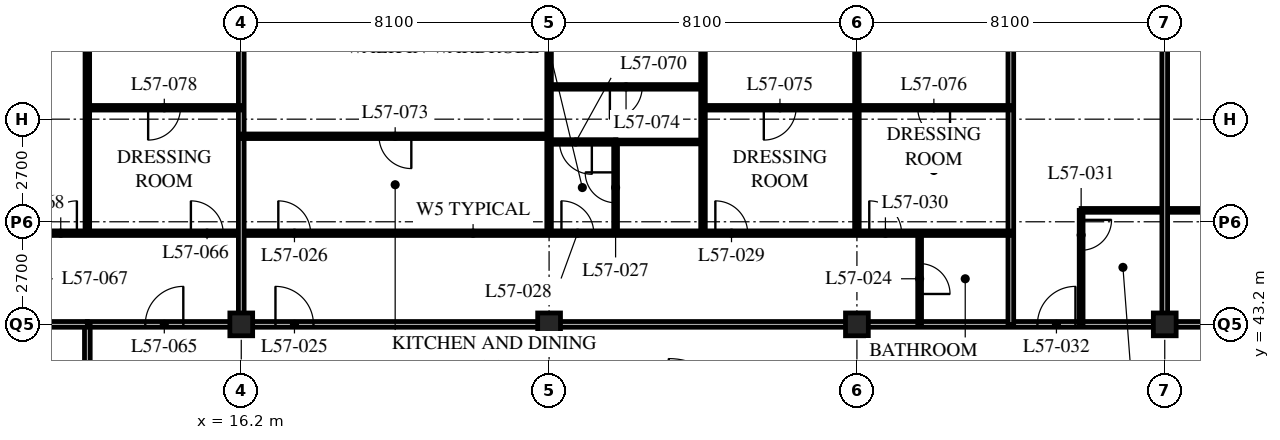
"""IFC4 building model, lengths in metres.
Left out: names, types, materials, properties, quantities, classifications, styles, units other than length and angle.
Written with IfcOpenShell. Run it as: python <this file> out.ifc"""

import sys

from ifc_helpers import new_model, si_unit, direction, frame, frame_2d, origin, origin_2d, place, context, subcontext, project, spatial, rectangle, hollow_rectangle, extrude, element, fill, save


model = new_model("IFC4")
c1 = context("Model", 3, precision=1e-05, world=origin(), true_north=direction((0.0, 1.0)))
c2 = subcontext(c1, "Body", "Model", "MODEL_VIEW")
j1 = project(units=[si_unit("LENGTHUNIT", "METRE"), si_unit("PLANEANGLEUNIT", "RADIAN")], contexts=[c1])
p1 = place(None, origin())
s1 = spatial("IfcSite", under=j1, at=p1, CompositionType="ELEMENT")
p2 = place(p1, origin())
s2 = spatial("IfcBuilding", under=s1, at=p2, CompositionType="ELEMENT")
p3 = place(p2, frame((0.0, 0.0, 220.8)))
s3 = spatial("IfcBuildingStorey", under=s2, at=p3, CompositionType="ELEMENT", Elevation=220.8)
for number, where, z_axis, x_axis in (
    (1, (16.2, 43.2, 0.0), (0.0, 0.0, 1.0), (1.0, 0.0, 0.0)),
    (2, (24.3, 43.2, 0.0), (0.0, 0.0, 1.0), (1.0, 0.0, 0.0)),
    (3, (32.4, 43.2, 0.0), (0.0, 0.0, 1.0), (1.0, 0.0, 0.0)),
    (4, (40.5, 43.2, 0.0), (0.0, 0.0, 1.0), (1.0, 0.0, 0.0)),
):
    element("IfcColumn", number, at=place(p3, frame(where, z_axis=z_axis, x_axis=x_axis)), inside=s3, PredefinedType="COLUMN", context=c2, shape_type="SweptSolid", body=[
        extrude(hollow_rectangle(XDim=0.6, YDim=0.6, WallThickness=0.05, at=origin_2d()), origin(), (0.0, 0.0, 1.0), 3.6),
    ])
p4 = place(p3, frame((12.15, 43.2, 0.0), z_axis=(0.0, 0.0, 1.0), x_axis=(1.0, 0.0, 0.0)))
e5 = element("IfcWall", 5, at=p4, inside=s3, PredefinedType="PARTITIONING", context=c2, shape_type="SweptSolid", body=[
    extrude(rectangle(XDim=36.45, YDim=0.15, at=frame_2d((18.225, 0.0))), origin(), (0.0, 0.0, 1.0), 2.628),
])
p5 = place(p4, frame((4.95, 0.0, 0.0)))
e6 = element("IfcOpeningElement", 6, at=p5, cuts=e5, PredefinedType="OPENING", context=c2, shape_type="SweptSolid", body=[
    extrude(rectangle(XDim=1.0, YDim=2.1, at=frame_2d((0.5, 1.05))), frame((0.0, 0.085, 0.0), z_axis=(0.0, -1.0, 0.0), x_axis=(1.0, 0.0, 0.0)), (0.0, 0.0, 1.0), 0.17),
])
p6 = place(p4, frame((25.0, 0.0, 0.0)))
e7 = element("IfcOpeningElement", 7, at=p6, cuts=e5, PredefinedType="OPENING", context=c2, shape_type="SweptSolid", body=[
    extrude(rectangle(XDim=1.0, YDim=2.1, at=frame_2d((0.5, 1.05))), frame((0.0, 0.085, 0.0), z_axis=(0.0, -1.0, 0.0), x_axis=(1.0, 0.0, 0.0)), (0.0, 0.0, 1.0), 0.17),
])
p7 = place(p4, frame((30.7, 0.0, 0.0)))
e8 = element("IfcOpeningElement", 8, at=p7, cuts=e5, PredefinedType="OPENING", context=c2, shape_type="SweptSolid", body=[
    extrude(rectangle(XDim=1.0, YDim=2.1, at=frame_2d((0.5, 1.05))), frame((0.0, 0.085, 0.0), z_axis=(0.0, -1.0, 0.0), x_axis=(1.0, 0.0, 0.0)), (0.0, 0.0, 1.0), 0.17),
])
p8 = place(p4, frame((33.925, 0.0, 0.0)))
e9 = element("IfcOpeningElement", 9, at=p8, cuts=e5, PredefinedType="OPENING", context=c2, shape_type="SweptSolid", body=[
    extrude(rectangle(XDim=1.0, YDim=2.1, at=frame_2d((0.5, 1.05))), frame((0.0, 0.085, 0.0), z_axis=(0.0, -1.0, 0.0), x_axis=(1.0, 0.0, 0.0)), (0.0, 0.0, 1.0), 0.17),
])
p9 = place(p4, frame((1.525, 0.0, 0.0)))
e10 = element("IfcOpeningElement", 10, at=p9, cuts=e5, PredefinedType="OPENING", context=c2, shape_type="SweptSolid", body=[
    extrude(rectangle(XDim=1.0, YDim=2.1, at=frame_2d((0.5, 1.05))), frame((0.0, 0.085, 0.0), z_axis=(0.0, -1.0, 0.0), x_axis=(1.0, 0.0, 0.0)), (0.0, 0.0, 1.0), 0.17),
])
p10 = place(p3, frame((12.15, 18.9, 0.0), z_axis=(0.0, 0.0, 1.0), x_axis=(0.0, 1.0, 0.0)))
e11 = element("IfcWall", 11, at=p10, inside=s3, PredefinedType="PARTITIONING", context=c2, shape_type="SweptSolid", body=[
    extrude(rectangle(XDim=24.3, YDim=0.15, at=frame_2d((12.15, 0.0))), origin(), (0.0, 0.0, 1.0), 3.39),
])
p11 = place(p10, frame((0.4, 0.0, 0.0)))
e12 = element("IfcOpeningElement", 12, at=p11, cuts=e11, PredefinedType="OPENING", context=c2, shape_type="SweptSolid", body=[
    extrude(rectangle(XDim=1.0, YDim=2.1, at=frame_2d((0.5, 1.05))), frame((0.0, 0.085, 0.0), z_axis=(0.0, -1.0, 0.0), x_axis=(1.0, 0.0, 0.0)), (0.0, 0.0, 1.0), 0.17),
])
p12 = place(p10, frame((16.6, 0.0, 0.0)))
e13 = element("IfcOpeningElement", 13, at=p12, cuts=e11, PredefinedType="OPENING", context=c2, shape_type="SweptSolid", body=[
    extrude(rectangle(XDim=1.0, YDim=2.1, at=frame_2d((0.5, 1.05))), frame((0.0, 0.085, 0.0), z_axis=(0.0, -1.0, 0.0), x_axis=(1.0, 0.0, 0.0)), (0.0, 0.0, 1.0), 0.17),
])
p13 = place(p3, frame((34.05, 43.2, 0.0), z_axis=(0.0, 0.0, 1.0), x_axis=(0.0, 1.0, 0.0)))
e14 = element("IfcWall", 14, at=p13, inside=s3, PredefinedType="PARTITIONING", context=c2, shape_type="SweptSolid", body=[
    extrude(rectangle(XDim=2.4, YDim=0.1, at=frame_2d((1.2, 0.0))), origin(), (0.0, 0.0, 1.0), 3.39),
])
p14 = place(p13, frame((0.8, 0.0, 0.0)))
e15 = element("IfcOpeningElement", 15, at=p14, cuts=e14, PredefinedType="OPENING", context=c2, shape_type="SweptSolid", body=[
    extrude(rectangle(XDim=0.8, YDim=2.1, at=frame_2d((0.4, 1.05))), frame((0.0, 0.06, 0.0), z_axis=(0.0, -1.0, 0.0), x_axis=(1.0, 0.0, 0.0)), (0.0, 0.0, 1.0), 0.12),
])
p15 = place(p3, frame((26.05, 45.6, 0.0), z_axis=(0.0, 0.0, 1.0), x_axis=(0.0, 1.0, 0.0)))
e16 = element("IfcWall", 16, at=p15, inside=s3, PredefinedType="PARTITIONING", context=c2, shape_type="SweptSolid", body=[
    extrude(rectangle(XDim=2.4, YDim=0.1, at=frame_2d((1.2, 0.0))), origin(), (0.0, 0.0, 1.0), 3.39),
])
p16 = place(p15, frame((0.8, 0.0, 0.0)))
e17 = element("IfcOpeningElement", 17, at=p16, cuts=e16, PredefinedType="OPENING", context=c2, shape_type="SweptSolid", body=[
    extrude(rectangle(XDim=0.8, YDim=2.1, at=frame_2d((0.4, 1.05))), frame((0.0, 0.06, 0.0), z_axis=(0.0, -1.0, 0.0), x_axis=(1.0, 0.0, 0.0)), (0.0, 0.0, 1.0), 0.12),
])
p17 = place(p3, frame((26.05, 48.0, 0.0), z_axis=(0.0, 0.0, 1.0), x_axis=(1.0, 0.0, 0.0)))
e18 = element("IfcWall", 18, at=p17, inside=s3, PredefinedType="PARTITIONING", context=c2, shape_type="SweptSolid", body=[
    extrude(rectangle(XDim=2.3, YDim=0.1, at=frame_2d((1.15, 0.0))), origin(), (0.0, 0.0, 1.0), 3.39),
])
p18 = place(p3, frame((24.3, 45.6, 0.0), z_axis=(0.0, 0.0, 1.0), x_axis=(0.0, 1.0, 0.0)))
e19 = element("IfcWall", 19, at=p18, inside=s3, PredefinedType="PARTITIONING", context=c2, shape_type="SweptSolid", body=[
    extrude(rectangle(XDim=13.5, YDim=0.12, at=frame_2d((6.75, 0.0))), origin(), (0.0, 0.0, 1.0), 2.628),
])
p19 = place(p3, frame((28.35, 45.6, 0.0), z_axis=(0.0, 0.0, 1.0), x_axis=(0.0, 1.0, 0.0)))
e20 = element("IfcWall", 20, at=p19, inside=s3, PredefinedType="PARTITIONING", context=c2, shape_type="SweptSolid", body=[
    extrude(rectangle(XDim=13.5, YDim=0.12, at=frame_2d((6.75, 0.0))), origin(), (0.0, 0.0, 1.0), 3.39),
])
p20 = place(p3, frame((32.4, 45.6, 0.0), z_axis=(0.0, 0.0, 1.0), x_axis=(0.0, 1.0, 0.0)))
e21 = element("IfcWall", 21, at=p20, inside=s3, PredefinedType="PARTITIONING", context=c2, shape_type="SweptSolid", body=[
    extrude(rectangle(XDim=13.5, YDim=0.12, at=frame_2d((6.75, 0.0))), origin(), (0.0, 0.0, 1.0), 2.628),
])
p21 = place(p3, frame((36.45, 43.2, 0.0), z_axis=(0.0, 0.0, 1.0), x_axis=(0.0, 1.0, 0.0)))
e22 = element("IfcWall", 22, at=p21, inside=s3, PredefinedType="PARTITIONING", context=c2, shape_type="SweptSolid", body=[
    extrude(rectangle(XDim=15.9, YDim=0.15, at=frame_2d((7.95, 0.0))), origin(), (0.0, 0.0, 1.0), 3.39),
])
p22 = place(p3, frame((38.3, 46.2, 0.0), z_axis=(0.0, 0.0, 1.0), x_axis=(1.0, 0.0, 0.0)))
e23 = element("IfcWall", 23, at=p22, inside=s3, PredefinedType="PARTITIONING", context=c2, shape_type="SweptSolid", body=[
    extrude(rectangle(XDim=4.4, YDim=0.1, at=frame_2d((2.2, 0.0))), origin(), (0.0, 0.0, 1.0), 3.39),
])
p23 = place(p3, frame((38.3, 43.2, 0.0), z_axis=(0.0, 0.0, 1.0), x_axis=(0.0, 1.0, 0.0)))
e24 = element("IfcWall", 24, at=p23, inside=s3, PredefinedType="PARTITIONING", context=c2, shape_type="SweptSolid", body=[
    extrude(rectangle(XDim=3.0, YDim=0.1, at=frame_2d((1.5, 0.0))), origin(), (0.0, 0.0, 1.0), 3.39),
])
p24 = place(p23, frame((1.95, 0.0, 0.0)))
e25 = element("IfcOpeningElement", 25, at=p24, cuts=e24, PredefinedType="OPENING", context=c2, shape_type="SweptSolid", body=[
    extrude(rectangle(XDim=0.8, YDim=2.1, at=frame_2d((0.4, 1.05))), frame((0.0, 0.06, 0.0), z_axis=(0.0, -1.0, 0.0), x_axis=(1.0, 0.0, 0.0)), (0.0, 0.0, 1.0), 0.12),
])
p25 = place(p3, frame((40.5, 43.2, 0.0), z_axis=(0.0, 0.0, 1.0), x_axis=(0.0, 1.0, 0.0)))
e26 = element("IfcWall", 26, at=p25, inside=s3, PredefinedType="PARTITIONING", context=c2, shape_type="SweptSolid", body=[
    extrude(rectangle(XDim=15.9, YDim=0.15, at=frame_2d((7.95, 0.0))), origin(), (0.0, 0.0, 1.0), 2.628),
])
p26 = place(p3, frame((8.15, 45.6, 0.0), z_axis=(0.0, 0.0, 1.0), x_axis=(1.0, 0.0, 0.0)))
e27 = element("IfcWall", 27, at=p26, inside=s3, PredefinedType="PARTITIONING", context=c2, shape_type="SweptSolid", body=[
    extrude(rectangle(XDim=28.3, YDim=0.12, at=frame_2d((14.15, 0.0))), origin(), (0.0, 0.0, 1.0), 3.39),
])
p27 = place(p26, frame((9.025, 0.0, 0.0)))
e28 = element("IfcOpeningElement", 28, at=p27, cuts=e27, PredefinedType="OPENING", context=c2, shape_type="SweptSolid", body=[
    extrude(rectangle(XDim=0.85, YDim=2.1, at=frame_2d((0.425, 1.05))), frame((0.0, 0.07, 0.0), z_axis=(0.0, -1.0, 0.0), x_axis=(1.0, 0.0, 0.0)), (0.0, 0.0, 1.0), 0.14),
])
p28 = place(p26, frame((16.475, 0.0, 0.0)))
e29 = element("IfcOpeningElement", 29, at=p28, cuts=e27, PredefinedType="OPENING", context=c2, shape_type="SweptSolid", body=[
    extrude(rectangle(XDim=0.85, YDim=2.1, at=frame_2d((0.425, 1.05))), frame((0.0, 0.07, 0.0), z_axis=(0.0, -1.0, 0.0), x_axis=(1.0, 0.0, 0.0)), (0.0, 0.0, 1.0), 0.14),
])
p29 = place(p26, frame((20.525, 0.0, 0.0)))
e30 = element("IfcOpeningElement", 30, at=p29, cuts=e27, PredefinedType="OPENING", context=c2, shape_type="SweptSolid", body=[
    extrude(rectangle(XDim=0.85, YDim=2.1, at=frame_2d((0.425, 1.05))), frame((0.0, 0.07, 0.0), z_axis=(0.0, -1.0, 0.0), x_axis=(1.0, 0.0, 0.0)), (0.0, 0.0, 1.0), 0.14),
])
p30 = place(p26, frame((24.575, 0.0, 0.0)))
e31 = element("IfcOpeningElement", 31, at=p30, cuts=e27, PredefinedType="OPENING", context=c2, shape_type="SweptSolid", body=[
    extrude(rectangle(XDim=0.85, YDim=2.1, at=frame_2d((0.425, 1.05))), frame((0.0, 0.07, 0.0), z_axis=(0.0, -1.0, 0.0), x_axis=(1.0, 0.0, 0.0)), (0.0, 0.0, 1.0), 0.14),
])
p31 = place(p26, frame((6.725, 0.0, 0.0)))
e32 = element("IfcOpeningElement", 32, at=p31, cuts=e27, PredefinedType="OPENING", context=c2, shape_type="SweptSolid", body=[
    extrude(rectangle(XDim=0.85, YDim=2.1, at=frame_2d((0.425, 1.05))), frame((0.0, 0.07, 0.0), z_axis=(0.0, -1.0, 0.0), x_axis=(1.0, 0.0, 0.0)), (0.0, 0.0, 1.0), 0.14),
])
p32 = place(p26, frame((2.875, 0.0, 0.0)))
e33 = element("IfcOpeningElement", 33, at=p32, cuts=e27, PredefinedType="OPENING", context=c2, shape_type="SweptSolid", body=[
    extrude(rectangle(XDim=0.85, YDim=2.1, at=frame_2d((0.425, 1.05))), frame((0.0, 0.07, 0.0), z_axis=(0.0, -1.0, 0.0), x_axis=(1.0, 0.0, 0.0)), (0.0, 0.0, 1.0), 0.14),
])
p33 = place(p3, frame((12.15, 45.6, 0.0), z_axis=(0.0, 0.0, 1.0), x_axis=(0.0, 1.0, 0.0)))
e34 = element("IfcWall", 34, at=p33, inside=s3, PredefinedType="PARTITIONING", context=c2, shape_type="SweptSolid", body=[
    extrude(rectangle(XDim=13.5, YDim=0.12, at=frame_2d((6.75, 0.0))), origin(), (0.0, 0.0, 1.0), 3.39),
])
p34 = place(p3, frame((0.3, 43.2, 0.0), z_axis=(0.0, 0.0, 1.0), x_axis=(1.0, 0.0, 0.0)))
e35 = element("IfcWall", 35, at=p34, inside=s3, PredefinedType="PARTITIONING", context=c2, shape_type="SweptSolid", body=[
    extrude(rectangle(XDim=11.85, YDim=0.15, at=frame_2d((5.925, 0.0))), origin(), (0.0, 0.0, 1.0), 2.628),
])
p35 = place(p3, frame((16.2, 43.2, 0.0), z_axis=(0.0, 0.0, 1.0), x_axis=(0.0, 1.0, 0.0)))
e36 = element("IfcWall", 36, at=p35, inside=s3, PredefinedType="PARTITIONING", context=c2, shape_type="SweptSolid", body=[
    extrude(rectangle(XDim=15.9, YDim=0.15, at=frame_2d((7.95, 0.0))), origin(), (0.0, 0.0, 1.0), 2.628),
])
p36 = place(p3, frame((24.3, 48.0, 0.0), z_axis=(0.0, 0.0, 1.0), x_axis=(1.0, 0.0, 0.0)))
e37 = element("IfcWall", 37, at=p36, inside=s3, PredefinedType="PARTITIONING", context=c2, shape_type="SweptSolid", body=[
    extrude(rectangle(XDim=1.76, YDim=0.12, at=frame_2d((0.88, 0.0))), origin(), (0.0, 0.0, 1.0), 3.39),
])
p37 = place(p36, frame((0.275, 0.0, 0.0)))
e38 = element("IfcOpeningElement", 38, at=p37, cuts=e37, PredefinedType="OPENING", context=c2, shape_type="SweptSolid", body=[
    extrude(rectangle(XDim=0.85, YDim=2.1, at=frame_2d((0.425, 1.05))), frame((0.0, 0.07, 0.0), z_axis=(0.0, -1.0, 0.0), x_axis=(1.0, 0.0, 0.0)), (0.0, 0.0, 1.0), 0.14),
])
p38 = place(p3, frame((16.2, 48.15, 0.0), z_axis=(0.0, 0.0, 1.0), x_axis=(1.0, 0.0, 0.0)))
e39 = element("IfcWall", 39, at=p38, inside=s3, PredefinedType="PARTITIONING", context=c2, shape_type="SweptSolid", body=[
    extrude(rectangle(XDim=8.1, YDim=0.12, at=frame_2d((4.05, 0.0))), origin(), (0.0, 0.0, 1.0), 3.39),
])
p39 = place(p38, frame((3.625, 0.0, 0.0)))
e40 = element("IfcOpeningElement", 40, at=p39, cuts=e39, PredefinedType="OPENING", context=c2, shape_type="SweptSolid", body=[
    extrude(rectangle(XDim=0.85, YDim=2.1, at=frame_2d((0.425, 1.05))), frame((0.0, 0.07, 0.0), z_axis=(0.0, -1.0, 0.0), x_axis=(1.0, 0.0, 0.0)), (0.0, 0.0, 1.0), 0.14),
])
p40 = place(p3, frame((24.3, 49.45, 0.0), z_axis=(0.0, 0.0, 1.0), x_axis=(1.0, 0.0, 0.0)))
e41 = element("IfcWall", 41, at=p40, inside=s3, PredefinedType="PARTITIONING", context=c2, shape_type="SweptSolid", body=[
    extrude(rectangle(XDim=4.05, YDim=0.12, at=frame_2d((2.025, 0.0))), origin(), (0.0, 0.0, 1.0), 3.39),
])
p41 = place(p40, frame((1.6, 0.0, 0.0)))
e42 = element("IfcOpeningElement", 42, at=p41, cuts=e41, PredefinedType="OPENING", context=c2, shape_type="SweptSolid", body=[
    extrude(rectangle(XDim=0.85, YDim=2.1, at=frame_2d((0.425, 1.05))), frame((0.0, 0.07, 0.0), z_axis=(0.0, -1.0, 0.0), x_axis=(1.0, 0.0, 0.0)), (0.0, 0.0, 1.0), 0.14),
])
p42 = place(p3, frame((28.35, 48.9, 0.0), z_axis=(0.0, 0.0, 1.0), x_axis=(1.0, 0.0, 0.0)))
e43 = element("IfcWall", 43, at=p42, inside=s3, PredefinedType="PARTITIONING", context=c2, shape_type="SweptSolid", body=[
    extrude(rectangle(XDim=8.1, YDim=0.12, at=frame_2d((4.05, 0.0))), origin(), (0.0, 0.0, 1.0), 3.39),
])
p43 = place(p42, frame((1.6, 0.0, 0.0)))
e44 = element("IfcOpeningElement", 44, at=p43, cuts=e43, PredefinedType="OPENING", context=c2, shape_type="SweptSolid", body=[
    extrude(rectangle(XDim=0.85, YDim=2.1, at=frame_2d((0.425, 1.05))), frame((0.0, 0.07, 0.0), z_axis=(0.0, -1.0, 0.0), x_axis=(1.0, 0.0, 0.0)), (0.0, 0.0, 1.0), 0.14),
])
p44 = place(p42, frame((5.65, 0.0, 0.0)))
e45 = element("IfcOpeningElement", 45, at=p44, cuts=e43, PredefinedType="OPENING", context=c2, shape_type="SweptSolid", body=[
    extrude(rectangle(XDim=0.85, YDim=2.1, at=frame_2d((0.425, 1.05))), frame((0.0, 0.07, 0.0), z_axis=(0.0, -1.0, 0.0), x_axis=(1.0, 0.0, 0.0)), (0.0, 0.0, 1.0), 0.14),
])
p45 = place(p3, frame((12.15, 48.9, 0.0), z_axis=(0.0, 0.0, 1.0), x_axis=(1.0, 0.0, 0.0)))
e46 = element("IfcWall", 46, at=p45, inside=s3, PredefinedType="PARTITIONING", context=c2, shape_type="SweptSolid", body=[
    extrude(rectangle(XDim=4.05, YDim=0.12, at=frame_2d((2.025, 0.0))), origin(), (0.0, 0.0, 1.0), 3.39),
])
p46 = place(p45, frame((1.6, 0.0, 0.0)))
e47 = element("IfcOpeningElement", 47, at=p46, cuts=e46, PredefinedType="OPENING", context=c2, shape_type="SweptSolid", body=[
    extrude(rectangle(XDim=0.85, YDim=2.1, at=frame_2d((0.425, 1.05))), frame((0.0, 0.07, 0.0), z_axis=(0.0, -1.0, 0.0), x_axis=(1.0, 0.0, 0.0)), (0.0, 0.0, 1.0), 0.14),
])
p47 = place(p14, origin())
e48 = element("IfcDoor", 48, at=p47, inside=s3, OperationType="SINGLE_SWING_RIGHT", PredefinedType="DOOR", context=c2, shape_type="SweptSolid", body=[
    extrude(rectangle(XDim=0.8, YDim=2.1, at=frame_2d((0.4, 1.05))), frame((0.0, 0.025, 0.0), z_axis=(0.0, -1.0, 0.0), x_axis=(1.0, 0.0, 0.0)), (0.0, 0.0, 1.0), 0.05),
])
fill(e15, e48)
p48 = place(p5, origin())
e49 = element("IfcDoor", 49, at=p48, inside=s3, OperationType="SINGLE_SWING_LEFT", PredefinedType="DOOR", context=c2, shape_type="SweptSolid", body=[
    extrude(rectangle(XDim=1.0, YDim=2.1, at=frame_2d((0.5, 1.05))), frame((0.0, 0.025, 0.0), z_axis=(0.0, -1.0, 0.0), x_axis=(1.0, 0.0, 0.0)), (0.0, 0.0, 1.0), 0.05),
])
fill(e6, e49)
p49 = place(p27, origin())
e50 = element("IfcDoor", 50, at=p49, inside=s3, OperationType="SINGLE_SWING_LEFT", PredefinedType="DOOR", context=c2, shape_type="SweptSolid", body=[
    extrude(rectangle(XDim=0.85, YDim=2.1, at=frame_2d((0.425, 1.05))), frame((0.0, 0.025, 0.0), z_axis=(0.0, -1.0, 0.0), x_axis=(1.0, 0.0, 0.0)), (0.0, 0.0, 1.0), 0.05),
])
fill(e28, e50)
p50 = place(p16, origin())
e51 = element("IfcDoor", 51, at=p50, inside=s3, OperationType="SINGLE_SWING_RIGHT", PredefinedType="DOOR", context=c2, shape_type="SweptSolid", body=[
    extrude(rectangle(XDim=0.8, YDim=2.1, at=frame_2d((0.4, 1.05))), frame((0.0, 0.025, 0.0), z_axis=(0.0, -1.0, 0.0), x_axis=(1.0, 0.0, 0.0)), (0.0, 0.0, 1.0), 0.05),
])
fill(e17, e51)
p51 = place(p28, origin())
e52 = element("IfcDoor", 52, at=p51, inside=s3, OperationType="SINGLE_SWING_LEFT", PredefinedType="DOOR", context=c2, shape_type="SweptSolid", body=[
    extrude(rectangle(XDim=0.85, YDim=2.1, at=frame_2d((0.425, 1.05))), frame((0.0, 0.025, 0.0), z_axis=(0.0, -1.0, 0.0), x_axis=(1.0, 0.0, 0.0)), (0.0, 0.0, 1.0), 0.05),
])
fill(e29, e52)
p52 = place(p29, origin())
e53 = element("IfcDoor", 53, at=p52, inside=s3, OperationType="SINGLE_SWING_LEFT", PredefinedType="DOOR", context=c2, shape_type="SweptSolid", body=[
    extrude(rectangle(XDim=0.85, YDim=2.1, at=frame_2d((0.425, 1.05))), frame((0.0, 0.025, 0.0), z_axis=(0.0, -1.0, 0.0), x_axis=(1.0, 0.0, 0.0)), (0.0, 0.0, 1.0), 0.05),
])
fill(e30, e53)
p53 = place(p30, origin())
e54 = element("IfcDoor", 54, at=p53, inside=s3, OperationType="SINGLE_SWING_LEFT", PredefinedType="DOOR", context=c2, shape_type="SweptSolid", body=[
    extrude(rectangle(XDim=0.85, YDim=2.1, at=frame_2d((0.425, 1.05))), frame((0.0, 0.025, 0.0), z_axis=(0.0, -1.0, 0.0), x_axis=(1.0, 0.0, 0.0)), (0.0, 0.0, 1.0), 0.05),
])
fill(e31, e54)
p54 = place(p24, origin())
e55 = element("IfcDoor", 55, at=p54, inside=s3, OperationType="SINGLE_SWING_LEFT", PredefinedType="DOOR", context=c2, shape_type="SweptSolid", body=[
    extrude(rectangle(XDim=0.8, YDim=2.1, at=frame_2d((0.4, 1.05))), frame((0.0, 0.025, 0.0), z_axis=(0.0, -1.0, 0.0), x_axis=(1.0, 0.0, 0.0)), (0.0, 0.0, 1.0), 0.05),
])
fill(e25, e55)
p55 = place(p6, origin())
e56 = element("IfcDoor", 56, at=p55, inside=s3, OperationType="SINGLE_SWING_RIGHT", PredefinedType="DOOR", context=c2, shape_type="SweptSolid", body=[
    extrude(rectangle(XDim=1.0, YDim=2.1, at=frame_2d((0.5, 1.05))), frame((0.0, 0.025, 0.0), z_axis=(0.0, -1.0, 0.0), x_axis=(1.0, 0.0, 0.0)), (0.0, 0.0, 1.0), 0.05),
])
fill(e7, e56)
p56 = place(p9, origin())
e57 = element("IfcDoor", 57, at=p56, inside=s3, OperationType="SINGLE_SWING_RIGHT", PredefinedType="DOOR", context=c2, shape_type="SweptSolid", body=[
    extrude(rectangle(XDim=1.0, YDim=2.1, at=frame_2d((0.5, 1.05))), frame((0.0, 0.025, 0.0), z_axis=(0.0, -1.0, 0.0), x_axis=(1.0, 0.0, 0.0)), (0.0, 0.0, 1.0), 0.05),
])
fill(e10, e57)
p57 = place(p31, origin())
e58 = element("IfcDoor", 58, at=p57, inside=s3, OperationType="SINGLE_SWING_LEFT", PredefinedType="DOOR", context=c2, shape_type="SweptSolid", body=[
    extrude(rectangle(XDim=0.85, YDim=2.1, at=frame_2d((0.425, 1.05))), frame((0.0, 0.025, 0.0), z_axis=(0.0, -1.0, 0.0), x_axis=(1.0, 0.0, 0.0)), (0.0, 0.0, 1.0), 0.05),
])
fill(e32, e58)
p58 = place(p32, origin())
e59 = element("IfcDoor", 59, at=p58, inside=s3, OperationType="SINGLE_SWING_RIGHT", PredefinedType="DOOR", context=c2, shape_type="SweptSolid", body=[
    extrude(rectangle(XDim=0.85, YDim=2.1, at=frame_2d((0.425, 1.05))), frame((0.0, 0.025, 0.0), z_axis=(0.0, -1.0, 0.0), x_axis=(1.0, 0.0, 0.0)), (0.0, 0.0, 1.0), 0.05),
])
fill(e33, e59)
p59 = place(p37, origin())
e60 = element("IfcDoor", 60, at=p59, inside=s3, OperationType="SINGLE_SWING_LEFT", PredefinedType="DOOR", context=c2, shape_type="SweptSolid", body=[
    extrude(rectangle(XDim=0.85, YDim=2.1, at=frame_2d((0.425, 1.05))), frame((0.0, 0.025, 0.0), z_axis=(0.0, -1.0, 0.0), x_axis=(1.0, 0.0, 0.0)), (0.0, 0.0, 1.0), 0.05),
])
fill(e38, e60)
p60 = place(p39, origin())
e61 = element("IfcDoor", 61, at=p60, inside=s3, OperationType="SINGLE_SWING_LEFT", PredefinedType="DOOR", context=c2, shape_type="SweptSolid", body=[
    extrude(rectangle(XDim=0.85, YDim=2.1, at=frame_2d((0.425, 1.05))), frame((0.0, 0.025, 0.0), z_axis=(0.0, -1.0, 0.0), x_axis=(1.0, 0.0, 0.0)), (0.0, 0.0, 1.0), 0.05),
])
fill(e40, e61)
p61 = place(p41, origin())
e62 = element("IfcDoor", 62, at=p61, inside=s3, OperationType="SINGLE_SWING_RIGHT", PredefinedType="DOOR", context=c2, shape_type="SweptSolid", body=[
    extrude(rectangle(XDim=0.85, YDim=2.1, at=frame_2d((0.425, 1.05))), frame((0.0, 0.025, 0.0), z_axis=(0.0, -1.0, 0.0), x_axis=(1.0, 0.0, 0.0)), (0.0, 0.0, 1.0), 0.05),
])
fill(e42, e62)
p62 = place(p43, origin())
e63 = element("IfcDoor", 63, at=p62, inside=s3, OperationType="SINGLE_SWING_RIGHT", PredefinedType="DOOR", context=c2, shape_type="SweptSolid", body=[
    extrude(rectangle(XDim=0.85, YDim=2.1, at=frame_2d((0.425, 1.05))), frame((0.0, 0.025, 0.0), z_axis=(0.0, -1.0, 0.0), x_axis=(1.0, 0.0, 0.0)), (0.0, 0.0, 1.0), 0.05),
])
fill(e44, e63)
p63 = place(p44, origin())
e64 = element("IfcDoor", 64, at=p63, inside=s3, OperationType="SINGLE_SWING_LEFT", PredefinedType="DOOR", context=c2, shape_type="SweptSolid", body=[
    extrude(rectangle(XDim=0.85, YDim=2.1, at=frame_2d((0.425, 1.05))), frame((0.0, 0.025, 0.0), z_axis=(0.0, -1.0, 0.0), x_axis=(1.0, 0.0, 0.0)), (0.0, 0.0, 1.0), 0.05),
])
fill(e45, e64)
p64 = place(p46, origin())
e65 = element("IfcDoor", 65, at=p64, inside=s3, OperationType="SINGLE_SWING_RIGHT", PredefinedType="DOOR", context=c2, shape_type="SweptSolid", body=[
    extrude(rectangle(XDim=0.85, YDim=2.1, at=frame_2d((0.425, 1.05))), frame((0.0, 0.025, 0.0), z_axis=(0.0, -1.0, 0.0), x_axis=(1.0, 0.0, 0.0)), (0.0, 0.0, 1.0), 0.05),
])
fill(e47, e65)
save(model, sys.argv[1])
